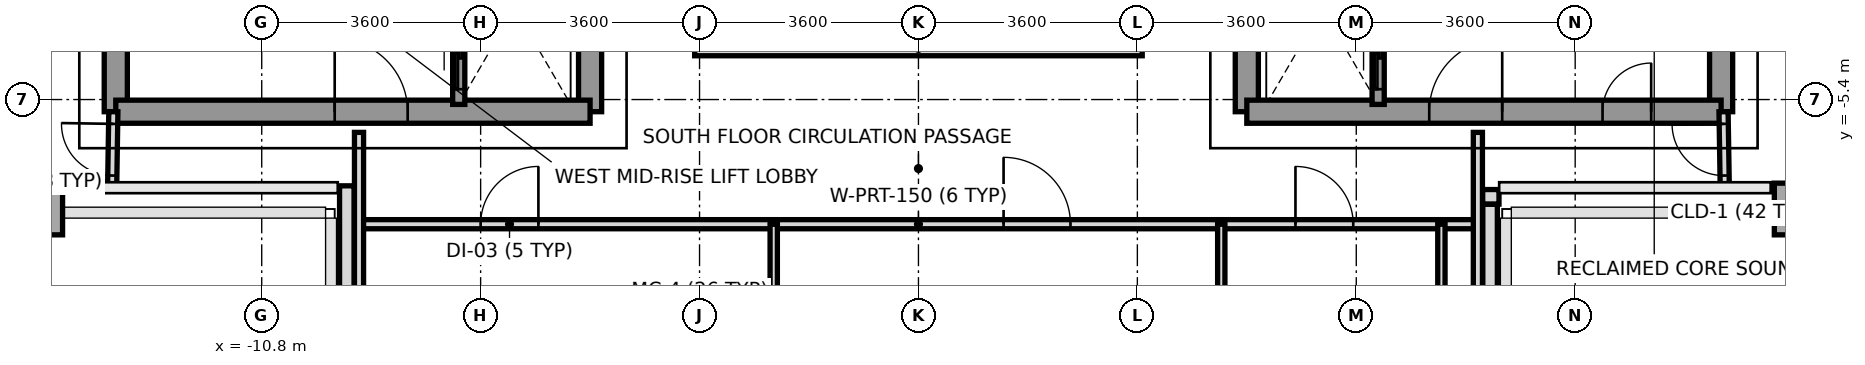
"""IFC4 building model, lengths in metres.
Left out: names, types, materials, properties, quantities, classifications, styles, units other than length and angle.
Written with IfcOpenShell. Run it as: python <this file> out.ifc"""

import sys

from ifc_helpers import new_model, si_unit, direction, frame, frame_2d, origin, origin_2d, place, context, subcontext, project, spatial, rectangle, extrude, source, transform, mapped, element, fill, save


model = new_model("IFC4")
c1 = context("Model", 3, precision=1e-05, world=origin(), true_north=direction((0.0, 1.0)))
c2 = subcontext(c1, "Body", "Model", "MODEL_VIEW")
j1 = project(units=[si_unit("LENGTHUNIT", "METRE"), si_unit("PLANEANGLEUNIT", "RADIAN")], contexts=[c1])
p1 = place(None, origin())
s1 = spatial("IfcSite", under=j1, at=p1, CompositionType="ELEMENT")
p2 = place(p1, origin())
s2 = spatial("IfcBuilding", under=s1, at=p2, CompositionType="ELEMENT")
p3 = place(p2, frame((0.0, 0.0, 174.0)))
s3 = spatial("IfcBuildingStorey", under=s2, at=p3, CompositionType="ELEMENT", Elevation=174.0)
m1 = source(origin(), c2, "Body", "SweptSolid", [
    extrude(rectangle(XDim=0.65, YDim=0.85, at=origin_2d()), origin(), (0.0, 0.0, 1.0), 3.2),
])
for number, where, z_axis, x_axis in (
    (1, (-14.4, -7.2, 0.0), (0.0, 0.0, 1.0), (1.0, 0.0, 0.0)),
    (2, (14.4, -7.2, 0.0), (0.0, 0.0, 1.0), (1.0, 0.0, 0.0)),
):
    element("IfcColumn", number, at=place(p3, frame(where, z_axis=z_axis, x_axis=x_axis)), inside=s3, PredefinedType="COLUMN", context=c2, shape_type="MappedRepresentation", body=[
        mapped(m1, transform((0.0, 0.0, 0.0), x_axis=(1.0, 0.0, 0.0), y_axis=(0.0, 1.0, 0.0), z_axis=(0.0, 0.0, 1.0), scale=1.0)),
    ])
p4 = place(p3, frame((9.547, -7.0, 0.0), z_axis=(0.0, 0.0, 1.0), x_axis=(-1.0, 0.0, 0.0)))
e3 = element("IfcWall", 3, at=p4, inside=s3, PredefinedType="PARAPET", context=c2, shape_type="SweptSolid", body=[
    extrude(rectangle(XDim=0.269, YDim=0.24, at=frame_2d((0.135, 0.0))), origin(), (0.0, 0.0, 1.0), 1.15),
])
p5 = place(p3, frame((9.4, -7.123, 0.0), z_axis=(0.0, 0.0, 1.0), x_axis=(0.0, -1.0, 0.0)))
e4 = element("IfcWall", 4, at=p5, inside=s3, PredefinedType="PARAPET", context=c2, shape_type="SweptSolid", body=[
    extrude(rectangle(XDim=1.424, YDim=0.24, at=frame_2d((0.712, 0.0))), origin(), (0.0, 0.0, 1.0), 1.15),
])
p6 = place(p3, frame((-9.4, -8.547, 0.0), z_axis=(0.0, 0.0, 1.0), x_axis=(0.0, 1.0, 0.0)))
e5 = element("IfcWall", 5, at=p6, inside=s3, PredefinedType="PARAPET", context=c2, shape_type="SweptSolid", body=[
    extrude(rectangle(XDim=1.728, YDim=0.24, at=frame_2d((0.864, 0.0))), origin(), (0.0, 0.0, 1.0), 1.15),
])
p7 = place(p3, frame((-13.2, -5.6, 0.0), z_axis=(0.0, 0.0, 1.0), x_axis=(0.0, 1.0, 0.0)))
e6 = element("IfcWall", 6, at=p7, inside=s3, PredefinedType="SHEAR", context=c2, shape_type="SweptSolid", body=[
    extrude(rectangle(XDim=11.2, YDim=0.38, at=frame_2d((5.6, 0.0))), origin(), (0.0, 0.0, 1.0), 3.2),
])
p8 = place(p3, frame((-5.4, -5.6, 0.0), z_axis=(0.0, 0.0, 1.0), x_axis=(0.0, 1.0, 0.0)))
e7 = element("IfcWall", 7, at=p8, inside=s3, PredefinedType="SHEAR", context=c2, shape_type="SweptSolid", body=[
    extrude(rectangle(XDim=12.5, YDim=0.38, at=frame_2d((6.25, 0.0))), origin(), (0.0, 0.0, 1.0), 3.2),
])
p9 = place(p8, frame((4.55, 0.0, 0.0)))
e8 = element("IfcOpeningElement", 8, at=p9, cuts=e7, PredefinedType="OPENING", context=c2, shape_type="SweptSolid", body=[
    extrude(rectangle(XDim=1.2, YDim=2.2, at=frame_2d((0.6, 1.1))), frame((0.0, 0.2, 0.0), z_axis=(0.0, -1.0, 0.0), x_axis=(1.0, 0.0, 0.0)), (0.0, 0.0, 1.0), 0.4),
])
p10 = place(p3, frame((-13.2, -5.6, 0.0), z_axis=(0.0, 0.0, 1.0), x_axis=(1.0, 0.0, 0.0)))
e9 = element("IfcWall", 9, at=p10, inside=s3, PredefinedType="SHEAR", context=c2, shape_type="SweptSolid", body=[
    extrude(rectangle(XDim=7.8, YDim=0.38, at=frame_2d((3.9, 0.0))), origin(), (0.0, 0.0, 1.0), 3.2),
])
p11 = place(p10, frame((3.6, 0.0, 0.0)))
e10 = element("IfcOpeningElement", 10, at=p11, cuts=e9, PredefinedType="OPENING", context=c2, shape_type="SweptSolid", body=[
    extrude(rectangle(XDim=1.2, YDim=2.2, at=frame_2d((0.6, 1.1))), frame((0.0, 0.2, 0.0), z_axis=(0.0, -1.0, 0.0), x_axis=(1.0, 0.0, 0.0)), (0.0, 0.0, 1.0), 0.4),
])
p12 = place(p3, frame((13.2, -5.6, 0.0), z_axis=(0.0, 0.0, 1.0), x_axis=(0.0, 1.0, 0.0)))
e11 = element("IfcWall", 11, at=p12, inside=s3, PredefinedType="SHEAR", context=c2, shape_type="SweptSolid", body=[
    extrude(rectangle(XDim=11.2, YDim=0.38, at=frame_2d((5.6, 0.0))), origin(), (0.0, 0.0, 1.0), 3.2),
])
p13 = place(p3, frame((5.4, -5.6, 0.0), z_axis=(0.0, 0.0, 1.0), x_axis=(0.0, 1.0, 0.0)))
e12 = element("IfcWall", 12, at=p13, inside=s3, PredefinedType="SHEAR", context=c2, shape_type="SweptSolid", body=[
    extrude(rectangle(XDim=12.5, YDim=0.38, at=frame_2d((6.25, 0.0))), origin(), (0.0, 0.0, 1.0), 3.2),
])
p14 = place(p13, frame((4.55, 0.0, 0.0)))
e13 = element("IfcOpeningElement", 13, at=p14, cuts=e12, PredefinedType="OPENING", context=c2, shape_type="SweptSolid", body=[
    extrude(rectangle(XDim=1.2, YDim=2.2, at=frame_2d((0.6, 1.1))), frame((0.0, 0.2, 0.0), z_axis=(0.0, -1.0, 0.0), x_axis=(1.0, 0.0, 0.0)), (0.0, 0.0, 1.0), 0.4),
])
p15 = place(p13, frame((7.88, 0.0, 0.0)))
e14 = element("IfcOpeningElement", 14, at=p15, cuts=e12, PredefinedType="OPENING", context=c2, shape_type="SweptSolid", body=[
    extrude(rectangle(XDim=0.8, YDim=2.1, at=frame_2d((0.4, 1.05))), frame((0.0, 0.2, 0.0), z_axis=(0.0, -1.0, 0.0), x_axis=(1.0, 0.0, 0.0)), (0.0, 0.0, 1.0), 0.4),
])
p16 = place(p3, frame((5.4, -5.6, 0.0), z_axis=(0.0, 0.0, 1.0), x_axis=(1.0, 0.0, 0.0)))
e15 = element("IfcWall", 15, at=p16, inside=s3, PredefinedType="SHEAR", context=c2, shape_type="SweptSolid", body=[
    extrude(rectangle(XDim=7.8, YDim=0.38, at=frame_2d((3.9, 0.0))), origin(), (0.0, 0.0, 1.0), 3.2),
])
p17 = place(p16, frame((3.0, 0.0, 0.0)))
e16 = element("IfcOpeningElement", 16, at=p17, cuts=e15, PredefinedType="OPENING", context=c2, shape_type="SweptSolid", body=[
    extrude(rectangle(XDim=1.2, YDim=2.2, at=frame_2d((0.6, 1.1))), frame((0.0, 0.2, 0.0), z_axis=(0.0, -1.0, 0.0), x_axis=(1.0, 0.0, 0.0)), (0.0, 0.0, 1.0), 0.4),
])
p18 = place(p16, frame((5.85, 0.0, 0.0)))
e17 = element("IfcOpeningElement", 17, at=p18, cuts=e15, PredefinedType="OPENING", context=c2, shape_type="SweptSolid", body=[
    extrude(rectangle(XDim=0.8, YDim=2.1, at=frame_2d((0.4, 1.05))), frame((0.0, 0.2, 0.0), z_axis=(0.0, -1.0, 0.0), x_axis=(1.0, 0.0, 0.0)), (0.0, 0.0, 1.0), 0.4),
])
p19 = place(p3, frame((-7.56, -5.48, 0.0), z_axis=(0.0, 0.0, 1.0), x_axis=(0.0, 1.0, 0.0)))
e18 = element("IfcWall", 18, at=p19, inside=s3, PredefinedType="SOLIDWALL", context=c2, shape_type="SweptSolid", body=[
    extrude(rectangle(XDim=1.6, YDim=0.2, at=frame_2d((0.8, 0.0))), origin(), (0.0, 0.0, 1.0), 3.2),
])
p20 = place(p19, frame((0.25, 0.0, 0.0)))
e19 = element("IfcOpeningElement", 19, at=p20, cuts=e18, PredefinedType="OPENING", context=c2, shape_type="SweptSolid", body=[
    extrude(rectangle(XDim=1.1, YDim=2.2, at=frame_2d((0.55, 1.1))), frame((0.0, 0.11, 0.0), z_axis=(0.0, -1.0, 0.0), x_axis=(1.0, 0.0, 0.0)), (0.0, 0.0, 1.0), 0.22),
])
p21 = place(p3, frame((7.56, -5.48, 0.0), z_axis=(0.0, 0.0, 1.0), x_axis=(0.0, 1.0, 0.0)))
e20 = element("IfcWall", 20, at=p21, inside=s3, PredefinedType="SOLIDWALL", context=c2, shape_type="SweptSolid", body=[
    extrude(rectangle(XDim=1.6, YDim=0.2, at=frame_2d((0.8, 0.0))), origin(), (0.0, 0.0, 1.0), 3.2),
])
p22 = place(p21, frame((0.25, 0.0, 0.0)))
e21 = element("IfcOpeningElement", 21, at=p22, cuts=e20, PredefinedType="OPENING", context=c2, shape_type="SweptSolid", body=[
    extrude(rectangle(XDim=1.1, YDim=2.2, at=frame_2d((0.55, 1.1))), frame((0.0, 0.11, 0.0), z_axis=(0.0, -1.0, 0.0), x_axis=(1.0, 0.0, 0.0)), (0.0, 0.0, 1.0), 0.22),
])
p23 = place(p3, frame((-9.2, -7.45, 0.0), z_axis=(0.0, 0.0, 1.0), x_axis=(1.0, 0.0, 0.0)))
e22 = element("IfcWall", 22, at=p23, inside=s3, PredefinedType="PARTITIONING", context=c2, shape_type="SweptSolid", body=[
    extrude(rectangle(XDim=18.4, YDim=0.15, at=frame_2d((9.2, 0.0))), origin(), (0.0, 0.0, 1.0), 2.8),
])
p24 = place(p23, frame((15.4, 0.0, 0.0)))
e23 = element("IfcOpeningElement", 23, at=p24, cuts=e22, PredefinedType="OPENING", context=c2, shape_type="SweptSolid", body=[
    extrude(rectangle(XDim=0.95, YDim=2.15, at=frame_2d((0.475, 1.075))), frame((0.0, 0.085, 0.0), z_axis=(0.0, -1.0, 0.0), x_axis=(1.0, 0.0, 0.0)), (0.0, 0.0, 1.0), 0.17),
])
p25 = place(p23, frame((2.0, 0.0, 0.0)))
e24 = element("IfcOpeningElement", 24, at=p25, cuts=e22, PredefinedType="OPENING", context=c2, shape_type="SweptSolid", body=[
    extrude(rectangle(XDim=0.95, YDim=2.15, at=frame_2d((0.475, 1.075))), frame((0.0, 0.085, 0.0), z_axis=(0.0, -1.0, 0.0), x_axis=(1.0, 0.0, 0.0)), (0.0, 0.0, 1.0), 0.17),
])
p26 = place(p23, frame((10.6, 0.0, 0.0)))
e25 = element("IfcOpeningElement", 25, at=p26, cuts=e22, PredefinedType="OPENING", context=c2, shape_type="SweptSolid", body=[
    extrude(rectangle(XDim=1.1, YDim=2.2, at=frame_2d((0.55, 1.1))), frame((0.0, 0.085, 0.0), z_axis=(0.0, -1.0, 0.0), x_axis=(1.0, 0.0, 0.0)), (0.0, 0.0, 1.0), 0.17),
])
for number, where, z_axis, x_axis in (
    (26, (-9.2, -15.68, 0.0), (0.0, 0.0, 1.0), (0.0, 1.0, 0.0)),
    (27, (9.2, -15.68, 0.0), (0.0, 0.0, 1.0), (0.0, 1.0, 0.0)),
):
    element("IfcWall", number, at=place(p3, frame(where, z_axis=z_axis, x_axis=x_axis)), inside=s3, PredefinedType="PARTITIONING", context=c2, shape_type="SweptSolid", body=[
        extrude(rectangle(XDim=9.74, YDim=0.15, at=frame_2d((4.87, 0.0))), origin(), (0.0, 0.0, 1.0), 2.75),
    ])
p27 = place(p3, frame((4.98, -10.95, 0.0), z_axis=(0.0, 0.0, 1.0), x_axis=(0.0, 1.0, 0.0)))
e28 = element("IfcWall", 28, at=p27, inside=s3, PredefinedType="PARTITIONING", context=c2, shape_type="SweptSolid", body=[
    extrude(rectangle(XDim=3.5, YDim=0.12, at=frame_2d((1.75, 0.0))), origin(), (0.0, 0.0, 1.0), 3.2),
])
p28 = place(p3, frame((8.6, -10.95, 0.0), z_axis=(0.0, 0.0, 1.0), x_axis=(0.0, 1.0, 0.0)))
e29 = element("IfcWall", 29, at=p28, inside=s3, PredefinedType="PARTITIONING", context=c2, shape_type="SweptSolid", body=[
    extrude(rectangle(XDim=3.5, YDim=0.12, at=frame_2d((1.75, 0.0))), origin(), (0.0, 0.0, 1.0), 2.75),
])
p29 = place(p3, frame((-2.38, -24.65, 0.0), z_axis=(0.0, 0.0, 1.0), x_axis=(0.0, 1.0, 0.0)))
e30 = element("IfcWall", 30, at=p29, inside=s3, PredefinedType="PARTITIONING", context=c2, shape_type="SweptSolid", body=[
    extrude(rectangle(XDim=17.2, YDim=0.12, at=frame_2d((8.6, 0.0))), origin(), (0.0, 0.0, 1.0), 2.75),
])
p30 = place(p3, frame((-13.26, -6.85, 0.0), z_axis=(0.0, 0.0, 1.0), x_axis=(0.016013571389, 0.999871774545, 0.0)))
e31 = element("IfcWall", 31, at=p30, inside=s3, PredefinedType="PARTITIONING", context=c2, shape_type="SweptSolid", body=[
    extrude(rectangle(XDim=1.25, YDim=0.15, at=frame_2d((0.625, 0.0))), origin(), (0.0, 0.0, 1.0), 3.2),
])
p31 = place(p30, frame((0.2, 0.0, 0.0)))
e32 = element("IfcOpeningElement", 32, at=p31, cuts=e31, PredefinedType="OPENING", context=c2, shape_type="SweptSolid", body=[
    extrude(rectangle(XDim=0.85, YDim=2.1, at=frame_2d((0.425, 1.05))), frame((0.0, 0.085, 0.0), z_axis=(0.0, -1.0, 0.0), x_axis=(1.0, 0.0, 0.0)), (0.0, 0.0, 1.0), 0.17),
])
p32 = place(p3, frame((13.26, -6.85, 0.0), z_axis=(0.0, 0.0, 1.0), x_axis=(-0.016013571389, 0.999871774545, 0.0)))
e33 = element("IfcWall", 33, at=p32, inside=s3, PredefinedType="PARTITIONING", context=c2, shape_type="SweptSolid", body=[
    extrude(rectangle(XDim=1.25, YDim=0.15, at=frame_2d((0.625, 0.0))), origin(), (0.0, 0.0, 1.0), 3.2),
])
p33 = place(p32, frame((0.2, 0.0, 0.0)))
e34 = element("IfcOpeningElement", 34, at=p33, cuts=e33, PredefinedType="OPENING", context=c2, shape_type="SweptSolid", body=[
    extrude(rectangle(XDim=0.85, YDim=2.1, at=frame_2d((0.425, 1.05))), frame((0.0, 0.085, 0.0), z_axis=(0.0, -1.0, 0.0), x_axis=(1.0, 0.0, 0.0)), (0.0, 0.0, 1.0), 0.17),
])
p34 = place(p3, frame((-3.68, -4.56, 0.0), z_axis=(0.0, 0.0, 1.0), x_axis=(1.0, 0.0, 0.0)))
e35 = element("IfcWall", 35, at=p34, inside=s3, PredefinedType="PARAPET", context=c2, shape_type="SweptSolid", body=[
    extrude(rectangle(XDim=7.36, YDim=0.24, at=frame_2d((3.68, 0.0))), origin(), (0.0, 0.0, 1.0), 1.15),
])
m2 = source(origin(), c2, "Body", "SweptSolid", [
    extrude(rectangle(XDim=1.2, YDim=2.2, at=frame_2d((0.6, 1.1))), frame((0.0, 0.025, 0.0), z_axis=(0.0, -1.0, 0.0), x_axis=(1.0, 0.0, 0.0)), (0.0, 0.0, 1.0), 0.05),
])
p35 = place(p11, origin())
e36 = element("IfcDoor", 36, at=p35, inside=s3, OperationType="SINGLE_SWING_LEFT", PredefinedType="DOOR", context=c2, shape_type="MappedRepresentation", body=[
    mapped(m2, transform((0.0, 0.0, 0.0), x_axis=(1.0, 0.0, 0.0), y_axis=(0.0, 1.0, 0.0), z_axis=(0.0, 0.0, 1.0), scale=1.0)),
])
fill(e10, e36)
p36 = place(p17, origin())
e37 = element("IfcDoor", 37, at=p36, inside=s3, OperationType="SINGLE_SWING_RIGHT", PredefinedType="DOOR", context=c2, shape_type="MappedRepresentation", body=[
    mapped(m2, transform((0.0, 0.0, 0.0), x_axis=(1.0, 0.0, 0.0), y_axis=(0.0, 1.0, 0.0), z_axis=(0.0, 0.0, 1.0), scale=1.0)),
])
fill(e16, e37)
m3 = source(origin(), c2, "Body", "SweptSolid", [
    extrude(rectangle(XDim=0.8, YDim=2.1, at=frame_2d((0.4, 1.05))), frame((0.0, 0.025, 0.0), z_axis=(0.0, -1.0, 0.0), x_axis=(1.0, 0.0, 0.0)), (0.0, 0.0, 1.0), 0.05),
])
p37 = place(p18, origin())
e38 = element("IfcDoor", 38, at=p37, inside=s3, OperationType="SINGLE_SWING_RIGHT", PredefinedType="DOOR", context=c2, shape_type="MappedRepresentation", body=[
    mapped(m3, transform((0.0, 0.0, 0.0), x_axis=(1.0, 0.0, 0.0), y_axis=(0.0, 1.0, 0.0), z_axis=(0.0, 0.0, 1.0), scale=1.0)),
])
fill(e17, e38)
m4 = source(origin(), c2, "Body", "SweptSolid", [
    extrude(rectangle(XDim=1.1, YDim=2.2, at=frame_2d((0.55, 1.1))), frame((0.0, 0.025, 0.0), z_axis=(0.0, -1.0, 0.0), x_axis=(1.0, 0.0, 0.0)), (0.0, 0.0, 1.0), 0.05),
])
p38 = place(p20, origin())
e39 = element("IfcDoor", 39, at=p38, inside=s3, OperationType="SLIDING_TO_LEFT", PredefinedType="DOOR", context=c2, shape_type="MappedRepresentation", body=[
    mapped(m4, transform((0.0, 0.0, 0.0), x_axis=(1.0, 0.0, 0.0), y_axis=(0.0, 1.0, 0.0), z_axis=(0.0, 0.0, 1.0), scale=1.0)),
])
fill(e19, e39)
p39 = place(p22, origin())
e40 = element("IfcDoor", 40, at=p39, inside=s3, OperationType="SLIDING_TO_LEFT", PredefinedType="DOOR", context=c2, shape_type="MappedRepresentation", body=[
    mapped(m4, transform((0.0, 0.0, 0.0), x_axis=(1.0, 0.0, 0.0), y_axis=(0.0, 1.0, 0.0), z_axis=(0.0, 0.0, 1.0), scale=1.0)),
])
fill(e21, e40)
m5 = source(origin(), c2, "Body", "SweptSolid", [
    extrude(rectangle(XDim=0.95, YDim=2.15, at=frame_2d((0.475, 1.075))), frame((0.0, 0.025, 0.0), z_axis=(0.0, -1.0, 0.0), x_axis=(1.0, 0.0, 0.0)), (0.0, 0.0, 1.0), 0.05),
])
p40 = place(p24, origin())
e41 = element("IfcDoor", 41, at=p40, inside=s3, OperationType="SINGLE_SWING_LEFT", PredefinedType="DOOR", context=c2, shape_type="MappedRepresentation", body=[
    mapped(m5, transform((0.0, 0.0, 0.0), x_axis=(1.0, 0.0, 0.0), y_axis=(0.0, 1.0, 0.0), z_axis=(0.0, 0.0, 1.0), scale=1.0)),
])
fill(e23, e41)
p41 = place(p25, origin())
e42 = element("IfcDoor", 42, at=p41, inside=s3, OperationType="SINGLE_SWING_RIGHT", PredefinedType="DOOR", context=c2, shape_type="MappedRepresentation", body=[
    mapped(m5, transform((0.0, 0.0, 0.0), x_axis=(1.0, 0.0, 0.0), y_axis=(0.0, 1.0, 0.0), z_axis=(0.0, 0.0, 1.0), scale=1.0)),
])
fill(e24, e42)
p42 = place(p26, origin())
e43 = element("IfcDoor", 43, at=p42, inside=s3, OperationType="SINGLE_SWING_LEFT", PredefinedType="DOOR", context=c2, shape_type="MappedRepresentation", body=[
    mapped(m4, transform((0.0, 0.0, 0.0), x_axis=(1.0, 0.0, 0.0), y_axis=(0.0, 1.0, 0.0), z_axis=(0.0, 0.0, 1.0), scale=1.0)),
])
fill(e25, e43)
m6 = source(origin(), c2, "Body", "SweptSolid", [
    extrude(rectangle(XDim=0.85, YDim=2.1, at=frame_2d((0.425, 1.05))), frame((0.0, 0.025, 0.0), z_axis=(0.0, -1.0, 0.0), x_axis=(1.0, 0.0, 0.0)), (0.0, 0.0, 1.0), 0.05),
])
p43 = place(p31, origin())
e44 = element("IfcDoor", 44, at=p43, inside=s3, OperationType="SINGLE_SWING_RIGHT", PredefinedType="DOOR", context=c2, shape_type="MappedRepresentation", body=[
    mapped(m6, transform((0.0, 0.0, 0.0), x_axis=(1.0, 0.0, 0.0), y_axis=(0.0, 1.0, 0.0), z_axis=(0.0, 0.0, 1.0), scale=1.0)),
])
fill(e32, e44)
p44 = place(p33, origin())
e45 = element("IfcDoor", 45, at=p44, inside=s3, OperationType="SINGLE_SWING_RIGHT", PredefinedType="DOOR", context=c2, shape_type="MappedRepresentation", body=[
    mapped(m6, transform((0.0, 0.0, 0.0), x_axis=(1.0, 0.0, 0.0), y_axis=(0.0, 1.0, 0.0), z_axis=(0.0, 0.0, 1.0), scale=1.0)),
])
fill(e34, e45)
save(model, sys.argv[1])
